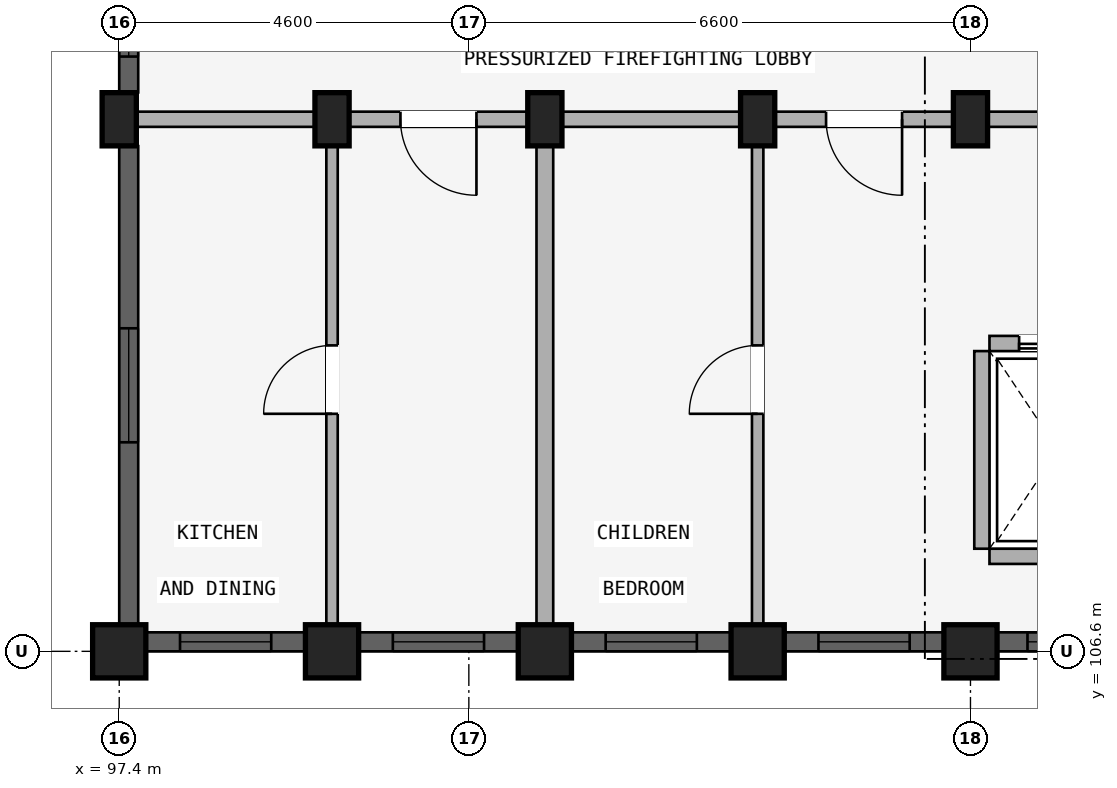
"""IFC4 building model, lengths in metres.
Left out: names, types, materials, properties, quantities, classifications, styles, units other than length and angle.
Written with IfcOpenShell. Run it as: python <this file> out.ifc"""

import sys

from ifc_helpers import new_model, si_unit, direction, frame, frame_2d, origin, origin_2d, place, context, subcontext, project, spatial, rectangle, extrude, element, fill, save


model = new_model("IFC4")
c1 = context("Model", 3, precision=1e-05, world=origin(), true_north=direction((0.0, 1.0)))
c2 = subcontext(c1, "Body", "Model", "MODEL_VIEW")
j1 = project(units=[si_unit("LENGTHUNIT", "METRE"), si_unit("PLANEANGLEUNIT", "RADIAN")], contexts=[c1])
p1 = place(None, origin())
s1 = spatial("IfcSite", under=j1, at=p1, CompositionType="ELEMENT")
p2 = place(p1, origin())
s2 = spatial("IfcBuilding", under=s1, at=p2, CompositionType="ELEMENT")
p3 = place(p2, frame((0.0, 0.0, 18.15)))
s3 = spatial("IfcBuildingStorey", under=s2, at=p3, CompositionType="ELEMENT", Elevation=18.15)
p4 = place(p3, frame((108.6, 106.6, 0.0), z_axis=(0.0, 0.0, 1.0), x_axis=(1.0, 0.0, 0.0)))
e1 = element("IfcColumn", 1, at=p4, inside=s3, PredefinedType="COLUMN", context=c2, shape_type="SweptSolid", body=[
    extrude(rectangle(XDim=0.7, YDim=0.7, at=origin_2d()), origin(), (0.0, 0.0, 1.0), 2.93),
])
p5 = place(p3, frame((108.6, 113.6, 0.0), z_axis=(0.0, 0.0, 1.0), x_axis=(1.0, 0.0, 0.0)))
e2 = element("IfcColumn", 2, at=p5, inside=s3, PredefinedType="COLUMN", context=c2, shape_type="SweptSolid", body=[
    extrude(rectangle(XDim=0.45, YDim=0.7, at=origin_2d()), origin(), (0.0, 0.0, 1.0), 2.93),
])
p6 = place(p3, frame((105.8, 106.6, 0.0), z_axis=(0.0, 0.0, 1.0), x_axis=(1.0, 0.0, 0.0)))
e3 = element("IfcColumn", 3, at=p6, inside=s3, PredefinedType="COLUMN", context=c2, shape_type="SweptSolid", body=[
    extrude(rectangle(XDim=0.7, YDim=0.7, at=origin_2d()), origin(), (0.0, 0.0, 1.0), 2.93),
])
p7 = place(p3, frame((105.8, 113.6, 0.0), z_axis=(0.0, 0.0, 1.0), x_axis=(1.0, 0.0, 0.0)))
e4 = element("IfcColumn", 4, at=p7, inside=s3, PredefinedType="COLUMN", context=c2, shape_type="SweptSolid", body=[
    extrude(rectangle(XDim=0.45, YDim=0.7, at=origin_2d()), origin(), (0.0, 0.0, 1.0), 2.93),
])
p8 = place(p3, frame((103.0, 106.6, 0.0), z_axis=(0.0, 0.0, 1.0), x_axis=(1.0, 0.0, 0.0)))
e5 = element("IfcColumn", 5, at=p8, inside=s3, PredefinedType="COLUMN", context=c2, shape_type="SweptSolid", body=[
    extrude(rectangle(XDim=0.7, YDim=0.7, at=origin_2d()), origin(), (0.0, 0.0, 1.0), 2.93),
])
p9 = place(p3, frame((103.0, 113.6, 0.0), z_axis=(0.0, 0.0, 1.0), x_axis=(1.0, 0.0, 0.0)))
e6 = element("IfcColumn", 6, at=p9, inside=s3, PredefinedType="COLUMN", context=c2, shape_type="SweptSolid", body=[
    extrude(rectangle(XDim=0.45, YDim=0.7, at=origin_2d()), origin(), (0.0, 0.0, 1.0), 2.93),
])
p10 = place(p3, frame((100.2, 106.6, 0.0), z_axis=(0.0, 0.0, 1.0), x_axis=(1.0, 0.0, 0.0)))
e7 = element("IfcColumn", 7, at=p10, inside=s3, PredefinedType="COLUMN", context=c2, shape_type="SweptSolid", body=[
    extrude(rectangle(XDim=0.7, YDim=0.7, at=origin_2d()), origin(), (0.0, 0.0, 1.0), 2.93),
])
p11 = place(p3, frame((100.2, 113.6, 0.0), z_axis=(0.0, 0.0, 1.0), x_axis=(1.0, 0.0, 0.0)))
e8 = element("IfcColumn", 8, at=p11, inside=s3, PredefinedType="COLUMN", context=c2, shape_type="SweptSolid", body=[
    extrude(rectangle(XDim=0.45, YDim=0.7, at=origin_2d()), origin(), (0.0, 0.0, 1.0), 2.93),
])
p12 = place(p3, frame((97.4, 106.6, 0.0), z_axis=(0.0, 0.0, 1.0), x_axis=(1.0, 0.0, 0.0)))
e9 = element("IfcColumn", 9, at=p12, inside=s3, PredefinedType="COLUMN", context=c2, shape_type="SweptSolid", body=[
    extrude(rectangle(XDim=0.7, YDim=0.7, at=origin_2d()), origin(), (0.0, 0.0, 1.0), 2.93),
])
p13 = place(p3, frame((97.4, 113.6, 0.0), z_axis=(0.0, 0.0, 1.0), x_axis=(1.0, 0.0, 0.0)))
e10 = element("IfcColumn", 10, at=p13, inside=s3, PredefinedType="COLUMN", context=c2, shape_type="SweptSolid", body=[
    extrude(rectangle(XDim=0.45, YDim=0.7, at=origin_2d()), origin(), (0.0, 0.0, 1.0), 2.93),
])
p14 = place(p3, frame((108.75, 107.95, 0.0), z_axis=(0.0, 0.0, 1.0), x_axis=(0.0, 1.0, 0.0)))
e11 = element("IfcWall", 11, at=p14, inside=s3, PredefinedType="STANDARD", context=c2, shape_type="SweptSolid", body=[
    extrude(rectangle(XDim=2.6, YDim=0.2, at=frame_2d((1.3, 0.0))), origin(), (0.0, 0.0, 1.0), 2.372),
])
p15 = place(p3, frame((110.65, 107.85, 0.0), z_axis=(0.0, 0.0, 1.0), x_axis=(-1.0, 0.0, 0.0)))
e12 = element("IfcWall", 12, at=p15, inside=s3, PredefinedType="STANDARD", context=c2, shape_type="SweptSolid", body=[
    extrude(rectangle(XDim=1.8, YDim=0.2, at=frame_2d((0.9, 0.0))), origin(), (0.0, 0.0, 1.0), 2.93),
])
p16 = place(p3, frame((110.65, 110.65, 0.0), z_axis=(0.0, 0.0, 1.0), x_axis=(-1.0, 0.0, 0.0)))
e13 = element("IfcWall", 13, at=p16, inside=s3, PredefinedType="STANDARD", context=c2, shape_type="SweptSolid", body=[
    extrude(rectangle(XDim=1.8, YDim=0.2, at=frame_2d((0.9, 0.0))), origin(), (0.0, 0.0, 1.0), 2.93),
])
p17 = place(p16, frame((0.39, 0.0, 0.0)))
e14 = element("IfcOpeningElement", 14, at=p17, cuts=e13, PredefinedType="OPENING", context=c2, shape_type="SweptSolid", body=[
    extrude(rectangle(XDim=1.02, YDim=2.15, at=frame_2d((0.51, 1.075))), frame((0.0, 0.11, 0.0), z_axis=(0.0, -1.0, 0.0), x_axis=(1.0, 0.0, 0.0)), (0.0, 0.0, 1.0), 0.22),
])
p18 = place(p3, frame((114.25, 113.6, 0.0), z_axis=(0.0, 0.0, 1.0), x_axis=(-1.0, 0.0, 0.0)))
e15 = element("IfcWall", 15, at=p18, inside=s3, PredefinedType="STANDARD", context=c2, shape_type="SweptSolid", body=[
    extrude(rectangle(XDim=5.6, YDim=0.2, at=frame_2d((2.8, 0.0))), origin(), (0.0, 0.0, 1.0), 2.372),
])
p19 = place(p18, frame((1.91, 0.0, 0.0)))
e16 = element("IfcOpeningElement", 16, at=p19, cuts=e15, PredefinedType="OPENING", context=c2, shape_type="SweptSolid", body=[
    extrude(rectangle(XDim=1.22, YDim=2.15, at=frame_2d((0.61, 1.075))), frame((0.0, 0.11, 0.0), z_axis=(0.0, -1.0, 0.0), x_axis=(1.0, 0.0, 0.0)), (0.0, 0.0, 1.0), 0.22),
])
p20 = place(p3, frame((108.6, 113.6, 0.0), z_axis=(0.0, 0.0, 1.0), x_axis=(-1.0, 0.0, 0.0)))
e17 = element("IfcWall", 17, at=p20, inside=s3, PredefinedType="STANDARD", context=c2, shape_type="SweptSolid", body=[
    extrude(rectangle(XDim=2.8, YDim=0.2, at=frame_2d((1.4, 0.0))), origin(), (0.0, 0.0, 1.0), 2.372),
])
p21 = place(p20, frame((0.9, 0.0, 0.0)))
e18 = element("IfcOpeningElement", 18, at=p21, cuts=e17, PredefinedType="OPENING", context=c2, shape_type="SweptSolid", body=[
    extrude(rectangle(XDim=1.0, YDim=2.15, at=frame_2d((0.5, 1.075))), frame((0.0, 0.11, 0.0), z_axis=(0.0, -1.0, 0.0), x_axis=(1.0, 0.0, 0.0)), (0.0, 0.0, 1.0), 0.22),
])
p22 = place(p3, frame((105.8, 113.6, 0.0), z_axis=(0.0, 0.0, 1.0), x_axis=(-1.0, 0.0, 0.0)))
e19 = element("IfcWall", 19, at=p22, inside=s3, PredefinedType="STANDARD", context=c2, shape_type="SweptSolid", body=[
    extrude(rectangle(XDim=2.8, YDim=0.2, at=frame_2d((1.4, 0.0))), origin(), (0.0, 0.0, 1.0), 2.372),
])
p23 = place(p3, frame((103.0, 113.6, 0.0), z_axis=(0.0, 0.0, 1.0), x_axis=(-1.0, 0.0, 0.0)))
e20 = element("IfcWall", 20, at=p23, inside=s3, PredefinedType="STANDARD", context=c2, shape_type="SweptSolid", body=[
    extrude(rectangle(XDim=2.8, YDim=0.2, at=frame_2d((1.4, 0.0))), origin(), (0.0, 0.0, 1.0), 2.372),
])
p24 = place(p23, frame((0.9, 0.0, 0.0)))
e21 = element("IfcOpeningElement", 21, at=p24, cuts=e20, PredefinedType="OPENING", context=c2, shape_type="SweptSolid", body=[
    extrude(rectangle(XDim=1.0, YDim=2.15, at=frame_2d((0.5, 1.075))), frame((0.0, 0.11, 0.0), z_axis=(0.0, -1.0, 0.0), x_axis=(1.0, 0.0, 0.0)), (0.0, 0.0, 1.0), 0.22),
])
p25 = place(p3, frame((100.2, 113.6, 0.0), z_axis=(0.0, 0.0, 1.0), x_axis=(-1.0, 0.0, 0.0)))
e22 = element("IfcWall", 22, at=p25, inside=s3, PredefinedType="STANDARD", context=c2, shape_type="SweptSolid", body=[
    extrude(rectangle(XDim=2.8, YDim=0.2, at=frame_2d((1.4, 0.0))), origin(), (0.0, 0.0, 1.0), 2.372),
])
p26 = place(p3, frame((105.8, 106.8, 0.0), z_axis=(0.0, 0.0, 1.0), x_axis=(0.0, 1.0, 0.0)))
e23 = element("IfcWall", 23, at=p26, inside=s3, PredefinedType="PARTITIONING", context=c2, shape_type="SweptSolid", body=[
    extrude(rectangle(XDim=6.75, YDim=0.15, at=frame_2d((3.375, 0.0))), origin(), (0.0, 0.0, 1.0), 2.372),
])
p27 = place(p26, frame((2.925, 0.0, 0.0)))
e24 = element("IfcOpeningElement", 24, at=p27, cuts=e23, PredefinedType="OPENING", context=c2, shape_type="SweptSolid", body=[
    extrude(rectangle(XDim=0.9, YDim=2.1, at=frame_2d((0.45, 1.05))), frame((0.0, 0.085, 0.0), z_axis=(0.0, -1.0, 0.0), x_axis=(1.0, 0.0, 0.0)), (0.0, 0.0, 1.0), 0.17),
])
p28 = place(p3, frame((103.0, 106.8, 0.0), z_axis=(0.0, 0.0, 1.0), x_axis=(0.0, 1.0, 0.0)))
e25 = element("IfcWall", 25, at=p28, inside=s3, PredefinedType="STANDARD", context=c2, shape_type="SweptSolid", body=[
    extrude(rectangle(XDim=6.75, YDim=0.22, at=frame_2d((3.375, 0.0))), origin(), (0.0, 0.0, 1.0), 2.372),
])
p29 = place(p3, frame((100.2, 106.8, 0.0), z_axis=(0.0, 0.0, 1.0), x_axis=(0.0, 1.0, 0.0)))
e26 = element("IfcWall", 26, at=p29, inside=s3, PredefinedType="PARTITIONING", context=c2, shape_type="SweptSolid", body=[
    extrude(rectangle(XDim=6.75, YDim=0.15, at=frame_2d((3.375, 0.0))), origin(), (0.0, 0.0, 1.0), 2.372),
])
p30 = place(p29, frame((2.925, 0.0, 0.0)))
e27 = element("IfcOpeningElement", 27, at=p30, cuts=e26, PredefinedType="OPENING", context=c2, shape_type="SweptSolid", body=[
    extrude(rectangle(XDim=0.9, YDim=2.1, at=frame_2d((0.45, 1.05))), frame((0.0, 0.085, 0.0), z_axis=(0.0, -1.0, 0.0), x_axis=(1.0, 0.0, 0.0)), (0.0, 0.0, 1.0), 0.17),
])
p31 = place(p3, frame((111.372, 106.725, 0.0), z_axis=(0.0, 0.0, 1.0), x_axis=(-1.0, 0.0, 0.0)))
e28 = element("IfcWall", 28, at=p31, inside=s3, PredefinedType="STANDARD", context=c2, shape_type="SweptSolid", body=[
    extrude(rectangle(XDim=2.422, YDim=0.25, at=frame_2d((1.211, 0.0))), origin(), (0.0, 0.0, 1.0), 2.472),
])
p32 = place(p31, frame((0.822, 0.0, 0.772)))
e29 = element("IfcOpeningElement", 29, at=p32, cuts=e28, PredefinedType="OPENING", context=c2, shape_type="SweptSolid", body=[
    extrude(rectangle(XDim=1.2, YDim=1.5, at=frame_2d((0.6, 0.75))), frame((0.0, 0.135, 0.0), z_axis=(0.0, -1.0, 0.0), x_axis=(1.0, 0.0, 0.0)), (0.0, 0.0, 1.0), 0.27),
])
p33 = place(p3, frame((108.247, 106.725, 0.0), z_axis=(0.0, 0.0, 1.0), x_axis=(-1.0, 0.0, 0.0)))
e30 = element("IfcWall", 30, at=p33, inside=s3, PredefinedType="STANDARD", context=c2, shape_type="SweptSolid", body=[
    extrude(rectangle(XDim=2.093, YDim=0.25, at=frame_2d((1.046, 0.0))), origin(), (0.0, 0.0, 1.0), 2.472),
])
p34 = place(p33, frame((0.447, 0.0, 0.772)))
e31 = element("IfcOpeningElement", 31, at=p34, cuts=e30, PredefinedType="OPENING", context=c2, shape_type="SweptSolid", body=[
    extrude(rectangle(XDim=1.2, YDim=1.5, at=frame_2d((0.6, 0.75))), frame((0.0, 0.135, 0.0), z_axis=(0.0, -1.0, 0.0), x_axis=(1.0, 0.0, 0.0)), (0.0, 0.0, 1.0), 0.27),
])
p35 = place(p3, frame((105.447, 106.725, 0.0), z_axis=(0.0, 0.0, 1.0), x_axis=(-1.0, 0.0, 0.0)))
e32 = element("IfcWall", 32, at=p35, inside=s3, PredefinedType="STANDARD", context=c2, shape_type="SweptSolid", body=[
    extrude(rectangle(XDim=2.093, YDim=0.25, at=frame_2d((1.046, 0.0))), origin(), (0.0, 0.0, 1.0), 2.472),
])
p36 = place(p35, frame((0.447, 0.0, 0.772)))
e33 = element("IfcOpeningElement", 33, at=p36, cuts=e32, PredefinedType="OPENING", context=c2, shape_type="SweptSolid", body=[
    extrude(rectangle(XDim=1.2, YDim=1.5, at=frame_2d((0.6, 0.75))), frame((0.0, 0.135, 0.0), z_axis=(0.0, -1.0, 0.0), x_axis=(1.0, 0.0, 0.0)), (0.0, 0.0, 1.0), 0.27),
])
p37 = place(p3, frame((102.646, 106.725, 0.0), z_axis=(0.0, 0.0, 1.0), x_axis=(-1.0, 0.0, 0.0)))
e34 = element("IfcWall", 34, at=p37, inside=s3, PredefinedType="STANDARD", context=c2, shape_type="SweptSolid", body=[
    extrude(rectangle(XDim=2.093, YDim=0.25, at=frame_2d((1.046, 0.0))), origin(), (0.0, 0.0, 1.0), 2.472),
])
p38 = place(p37, frame((0.447, 0.0, 0.772)))
e35 = element("IfcOpeningElement", 35, at=p38, cuts=e34, PredefinedType="OPENING", context=c2, shape_type="SweptSolid", body=[
    extrude(rectangle(XDim=1.2, YDim=1.5, at=frame_2d((0.6, 0.75))), frame((0.0, 0.135, 0.0), z_axis=(0.0, -1.0, 0.0), x_axis=(1.0, 0.0, 0.0)), (0.0, 0.0, 1.0), 0.27),
])
p39 = place(p3, frame((99.846, 106.725, 0.0), z_axis=(0.0, 0.0, 1.0), x_axis=(-1.0, 0.0, 0.0)))
e36 = element("IfcWall", 36, at=p39, inside=s3, PredefinedType="STANDARD", context=c2, shape_type="SweptSolid", body=[
    extrude(rectangle(XDim=2.093, YDim=0.25, at=frame_2d((1.046, 0.0))), origin(), (0.0, 0.0, 1.0), 2.472),
])
p40 = place(p39, frame((0.447, 0.0, 0.772)))
e37 = element("IfcOpeningElement", 37, at=p40, cuts=e36, PredefinedType="OPENING", context=c2, shape_type="SweptSolid", body=[
    extrude(rectangle(XDim=1.2, YDim=1.5, at=frame_2d((0.6, 0.75))), frame((0.0, 0.135, 0.0), z_axis=(0.0, -1.0, 0.0), x_axis=(1.0, 0.0, 0.0)), (0.0, 0.0, 1.0), 0.27),
])
p41 = place(p3, frame((97.525, 106.954, 0.0), z_axis=(0.0, 0.0, 1.0), x_axis=(0.0, 1.0, 0.0)))
e38 = element("IfcWall", 38, at=p41, inside=s3, PredefinedType="STANDARD", context=c2, shape_type="SweptSolid", body=[
    extrude(rectangle(XDim=6.293, YDim=0.25, at=frame_2d((3.146, 0.0))), origin(), (0.0, 0.0, 1.0), 2.372),
])
p42 = place(p41, frame((2.396, 0.0, 0.522)))
e39 = element("IfcOpeningElement", 39, at=p42, cuts=e38, PredefinedType="OPENING", context=c2, shape_type="SweptSolid", body=[
    extrude(rectangle(XDim=1.5, YDim=1.65, at=frame_2d((0.75, 0.825))), frame((0.0, 0.135, 0.0), z_axis=(0.0, -1.0, 0.0), x_axis=(1.0, 0.0, 0.0)), (0.0, 0.0, 1.0), 0.27),
])
p43 = place(p3, frame((97.525, 113.954, 0.0), z_axis=(0.0, 0.0, 1.0), x_axis=(0.0, 1.0, 0.0)))
e40 = element("IfcWall", 40, at=p43, inside=s3, PredefinedType="STANDARD", context=c2, shape_type="SweptSolid", body=[
    extrude(rectangle(XDim=1.693, YDim=0.25, at=frame_2d((0.846, 0.0))), origin(), (0.0, 0.0, 1.0), 2.372),
])
p44 = place(p43, frame((0.471, 0.0, 0.88)))
e41 = element("IfcOpeningElement", 41, at=p44, cuts=e40, PredefinedType="OPENING", context=c2, shape_type="SweptSolid", body=[
    extrude(rectangle(XDim=0.75, YDim=1.05, at=frame_2d((0.375, 0.525))), frame((0.0, 0.135, 0.0), z_axis=(0.0, -1.0, 0.0), x_axis=(1.0, 0.0, 0.0)), (0.0, 0.0, 1.0), 0.27),
])
p45 = place(p32, origin())
e42 = element("IfcWindow", 42, at=p45, inside=s3, PartitioningType="SINGLE_PANEL", PredefinedType="WINDOW", context=c2, shape_type="SweptSolid", body=[
    extrude(rectangle(XDim=1.2, YDim=1.5, at=frame_2d((0.6, 0.75))), frame((0.0, 0.03, 0.0), z_axis=(0.0, -1.0, 0.0), x_axis=(1.0, 0.0, 0.0)), (0.0, 0.0, 1.0), 0.06),
])
fill(e29, e42)
p46 = place(p34, origin())
e43 = element("IfcWindow", 43, at=p46, inside=s3, PartitioningType="SINGLE_PANEL", PredefinedType="WINDOW", context=c2, shape_type="SweptSolid", body=[
    extrude(rectangle(XDim=1.2, YDim=1.5, at=frame_2d((0.6, 0.75))), frame((0.0, 0.03, 0.0), z_axis=(0.0, -1.0, 0.0), x_axis=(1.0, 0.0, 0.0)), (0.0, 0.0, 1.0), 0.06),
])
fill(e31, e43)
p47 = place(p36, origin())
e44 = element("IfcWindow", 44, at=p47, inside=s3, PartitioningType="SINGLE_PANEL", PredefinedType="WINDOW", context=c2, shape_type="SweptSolid", body=[
    extrude(rectangle(XDim=1.2, YDim=1.5, at=frame_2d((0.6, 0.75))), frame((0.0, 0.03, 0.0), z_axis=(0.0, -1.0, 0.0), x_axis=(1.0, 0.0, 0.0)), (0.0, 0.0, 1.0), 0.06),
])
fill(e33, e44)
p48 = place(p38, origin())
e45 = element("IfcWindow", 45, at=p48, inside=s3, PartitioningType="SINGLE_PANEL", PredefinedType="WINDOW", context=c2, shape_type="SweptSolid", body=[
    extrude(rectangle(XDim=1.2, YDim=1.5, at=frame_2d((0.6, 0.75))), frame((0.0, 0.03, 0.0), z_axis=(0.0, -1.0, 0.0), x_axis=(1.0, 0.0, 0.0)), (0.0, 0.0, 1.0), 0.06),
])
fill(e35, e45)
p49 = place(p40, origin())
e46 = element("IfcWindow", 46, at=p49, inside=s3, PartitioningType="SINGLE_PANEL", PredefinedType="WINDOW", context=c2, shape_type="SweptSolid", body=[
    extrude(rectangle(XDim=1.2, YDim=1.5, at=frame_2d((0.6, 0.75))), frame((0.0, 0.03, 0.0), z_axis=(0.0, -1.0, 0.0), x_axis=(1.0, 0.0, 0.0)), (0.0, 0.0, 1.0), 0.06),
])
fill(e37, e46)
p50 = place(p42, origin())
e47 = element("IfcWindow", 47, at=p50, inside=s3, PartitioningType="DOUBLE_PANEL_VERTICAL", PredefinedType="WINDOW", context=c2, shape_type="SweptSolid", body=[
    extrude(rectangle(XDim=1.5, YDim=1.65, at=frame_2d((0.75, 0.825))), frame((0.0, 0.03, 0.0), z_axis=(0.0, -1.0, 0.0), x_axis=(1.0, 0.0, 0.0)), (0.0, 0.0, 1.0), 0.06),
])
fill(e39, e47)
p51 = place(p44, origin())
e48 = element("IfcWindow", 48, at=p51, inside=s3, PartitioningType="SINGLE_PANEL", PredefinedType="WINDOW", context=c2, shape_type="SweptSolid", body=[
    extrude(rectangle(XDim=0.75, YDim=1.05, at=frame_2d((0.375, 0.525))), frame((0.0, 0.03, 0.0), z_axis=(0.0, -1.0, 0.0), x_axis=(1.0, 0.0, 0.0)), (0.0, 0.0, 1.0), 0.06),
])
fill(e41, e48)
p52 = place(p17, origin())
e49 = element("IfcDoor", 49, at=p52, inside=s3, OperationType="SLIDING_TO_RIGHT", PredefinedType="DOOR", context=c2, shape_type="SweptSolid", body=[
    extrude(rectangle(XDim=1.02, YDim=2.15, at=frame_2d((0.51, 1.075))), frame((0.0, 0.025, 0.0), z_axis=(0.0, -1.0, 0.0), x_axis=(1.0, 0.0, 0.0)), (0.0, 0.0, 1.0), 0.05),
])
fill(e14, e49)
p53 = place(p21, origin())
e50 = element("IfcDoor", 50, at=p53, inside=s3, OperationType="SINGLE_SWING_LEFT", PredefinedType="DOOR", context=c2, shape_type="SweptSolid", body=[
    extrude(rectangle(XDim=1.0, YDim=2.15, at=frame_2d((0.5, 1.075))), frame((0.0, 0.025, 0.0), z_axis=(0.0, -1.0, 0.0), x_axis=(1.0, 0.0, 0.0)), (0.0, 0.0, 1.0), 0.05),
])
fill(e18, e50)
p54 = place(p24, origin())
e51 = element("IfcDoor", 51, at=p54, inside=s3, OperationType="SINGLE_SWING_LEFT", PredefinedType="DOOR", context=c2, shape_type="SweptSolid", body=[
    extrude(rectangle(XDim=1.0, YDim=2.15, at=frame_2d((0.5, 1.075))), frame((0.0, 0.025, 0.0), z_axis=(0.0, -1.0, 0.0), x_axis=(1.0, 0.0, 0.0)), (0.0, 0.0, 1.0), 0.05),
])
fill(e21, e51)
p55 = place(p27, frame((0.9, 0.0, 0.0), z_axis=(0.0, 0.0, 1.0), x_axis=(-1.0, 0.0, 0.0)))
e52 = element("IfcDoor", 52, at=p55, inside=s3, OperationType="SINGLE_SWING_RIGHT", PredefinedType="DOOR", context=c2, shape_type="SweptSolid", body=[
    extrude(rectangle(XDim=0.9, YDim=2.1, at=frame_2d((0.45, 1.05))), frame((0.0, 0.025, 0.0), z_axis=(0.0, -1.0, 0.0), x_axis=(1.0, 0.0, 0.0)), (0.0, 0.0, 1.0), 0.05),
])
fill(e24, e52)
p56 = place(p30, origin())
e53 = element("IfcDoor", 53, at=p56, inside=s3, OperationType="SINGLE_SWING_LEFT", PredefinedType="DOOR", context=c2, shape_type="SweptSolid", body=[
    extrude(rectangle(XDim=0.9, YDim=2.1, at=frame_2d((0.45, 1.05))), frame((0.0, 0.025, 0.0), z_axis=(0.0, -1.0, 0.0), x_axis=(1.0, 0.0, 0.0)), (0.0, 0.0, 1.0), 0.05),
])
fill(e27, e53)
save(model, sys.argv[1])
